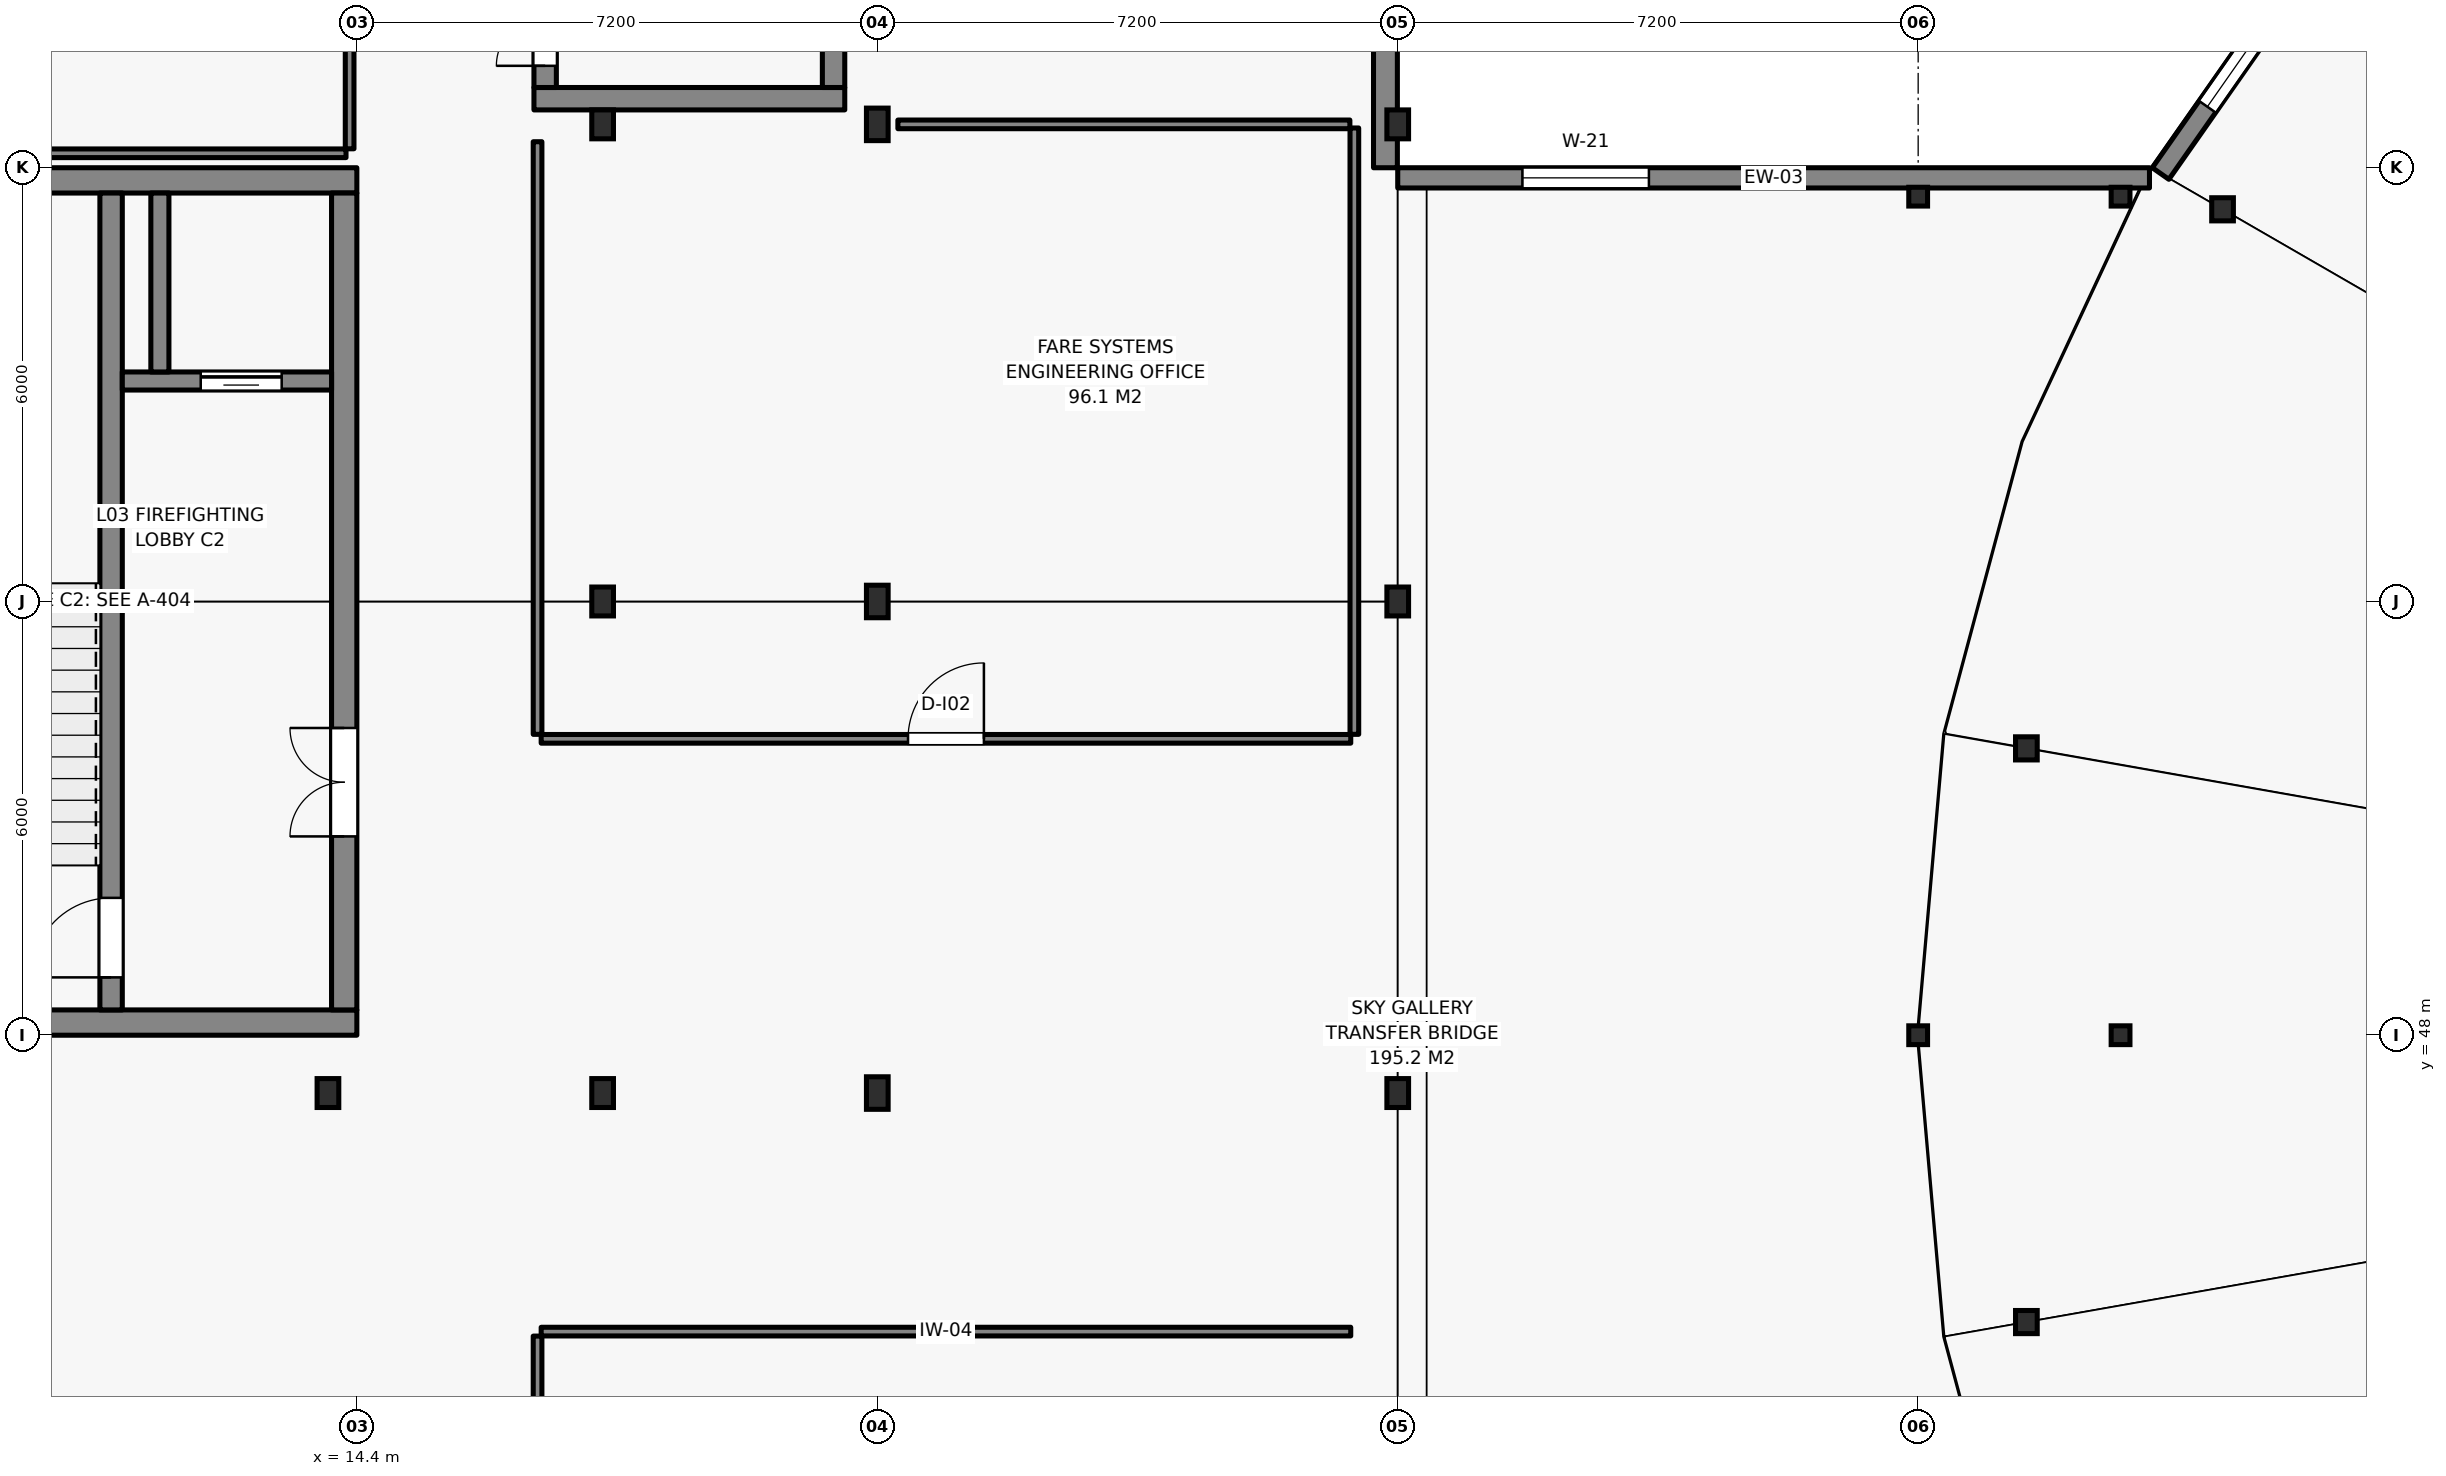
"""IFC4 building model, lengths in metres.
Left out: names, types, materials, properties, quantities, classifications, styles, units other than length and angle.
Written with IfcOpenShell. Run it as: python <this file> out.ifc"""

import sys

from ifc_helpers import new_model, si_unit, direction, frame, frame_2d, origin, origin_2d, place, context, subcontext, project, spatial, rectangle, i_section, extrude, element, fill, save


model = new_model("IFC4")
c1 = context("Model", 3, precision=1e-05, world=origin(), true_north=direction((0.0, 1.0)))
c2 = subcontext(c1, "Body", "Model", "MODEL_VIEW")
j1 = project(units=[si_unit("LENGTHUNIT", "METRE"), si_unit("PLANEANGLEUNIT", "RADIAN")], contexts=[c1])
p1 = place(None, origin())
s1 = spatial("IfcSite", under=j1, at=p1, CompositionType="ELEMENT")
p2 = place(p1, origin())
s2 = spatial("IfcBuilding", under=s1, at=p2, CompositionType="ELEMENT")
p3 = place(p2, frame((0.0, 0.0, 10.5)))
s3 = spatial("IfcBuildingStorey", under=s2, at=p3, CompositionType="ELEMENT", Elevation=10.5)
for number, where, z_axis, x_axis in (
    (1, (7.2, 48.175, 0.0), (0.0, 0.0, 1.0), (1.0, 0.0, 0.0)),
    (2, (7.2, 59.825, 0.0), (0.0, 0.0, 1.0), (1.0, 0.0, 0.0)),
):
    element("IfcWall", number, at=place(p3, frame(where, z_axis=z_axis, x_axis=x_axis)), inside=s3, PredefinedType="SHEAR", context=c2, shape_type="SweptSolid", body=[
        extrude(rectangle(XDim=7.2, YDim=0.35, at=frame_2d((3.6, 0.0))), origin(), (0.0, 0.0, 1.0), 3.95),
    ])
p4 = place(p3, frame((14.225, 48.35, 0.0), z_axis=(0.0, 0.0, 1.0), x_axis=(0.0, 1.0, 0.0)))
e3 = element("IfcWall", 3, at=p4, inside=s3, PredefinedType="SHEAR", context=c2, shape_type="SweptSolid", body=[
    extrude(rectangle(XDim=11.3, YDim=0.35, at=frame_2d((5.65, 0.0))), origin(), (0.0, 0.0, 1.0), 3.95),
])
p5 = place(p4, frame((2.4, 0.0, 0.0)))
e4 = element("IfcOpeningElement", 4, at=p5, cuts=e3, PredefinedType="OPENING", context=c2, shape_type="SweptSolid", body=[
    extrude(rectangle(XDim=1.5, YDim=2.15, at=frame_2d((0.75, 1.075))), frame((0.0, 0.185, 0.0), z_axis=(0.0, -1.0, 0.0), x_axis=(1.0, 0.0, 0.0)), (0.0, 0.0, 1.0), 0.37),
])
p6 = place(p3, frame((11.0, 48.35, 0.0), z_axis=(0.0, 0.0, 1.0), x_axis=(0.0, 1.0, 0.0)))
e5 = element("IfcWall", 5, at=p6, inside=s3, PredefinedType="SHEAR", context=c2, shape_type="SweptSolid", body=[
    extrude(rectangle(XDim=11.3, YDim=0.31, at=frame_2d((5.65, 0.0))), origin(), (0.0, 0.0, 1.0), 3.95),
])
p7 = place(p6, frame((0.45, 0.0, 0.0)))
e6 = element("IfcOpeningElement", 6, at=p7, cuts=e5, PredefinedType="OPENING", context=c2, shape_type="SweptSolid", body=[
    extrude(rectangle(XDim=1.1, YDim=2.15, at=frame_2d((0.55, 1.075))), frame((0.0, 0.165, 0.0), z_axis=(0.0, -1.0, 0.0), x_axis=(1.0, 0.0, 0.0)), (0.0, 0.0, 1.0), 0.33),
])
p8 = place(p3, frame((16.85, 60.955, 0.0), z_axis=(0.0, 0.0, 1.0), x_axis=(1.0, 0.0, 0.0)))
e7 = element("IfcWall", 7, at=p8, inside=s3, PredefinedType="SHEAR", context=c2, shape_type="SweptSolid", body=[
    extrude(rectangle(XDim=4.3, YDim=0.31, at=frame_2d((2.15, 0.0))), origin(), (0.0, 0.0, 1.0), 3.95),
])
p9 = place(p3, frame((17.005, 61.11, 0.0), z_axis=(0.0, 0.0, 1.0), x_axis=(0.0, 1.0, 0.0)))
e8 = element("IfcWall", 8, at=p9, inside=s3, PredefinedType="SHEAR", context=c2, shape_type="SweptSolid", body=[
    extrude(rectangle(XDim=9.58, YDim=0.31, at=frame_2d((4.79, 0.0))), origin(), (0.0, 0.0, 1.0), 3.95),
])
p10 = place(p9, frame((0.3, 0.0, 0.0)))
e9 = element("IfcOpeningElement", 9, at=p10, cuts=e8, PredefinedType="OPENING", context=c2, shape_type="SweptSolid", body=[
    extrude(rectangle(XDim=1.35, YDim=2.15, at=frame_2d((0.675, 1.075))), frame((0.0, 0.165, 0.0), z_axis=(0.0, -1.0, 0.0), x_axis=(1.0, 0.0, 0.0)), (0.0, 0.0, 1.0), 0.33),
])
p11 = place(p3, frame((20.995, 61.11, 0.0), z_axis=(0.0, 0.0, 1.0), x_axis=(0.0, 1.0, 0.0)))
e10 = element("IfcWall", 10, at=p11, inside=s3, PredefinedType="SHEAR", context=c2, shape_type="SweptSolid", body=[
    extrude(rectangle(XDim=9.58, YDim=0.31, at=frame_2d((4.79, 0.0))), origin(), (0.0, 0.0, 1.0), 3.95),
])
for number, where, z_axis, x_axis in (
    (11, (14.0, 47.2, 0.0), (0.0, 0.0, 1.0), (1.0, 0.0, 0.0)),
    (12, (17.8, 47.2, 0.0), (0.0, 0.0, 1.0), (1.0, 0.0, 0.0)),
    (13, (17.8, 54.0, 0.0), (0.0, 0.0, 1.0), (1.0, 0.0, 0.0)),
    (14, (17.8, 60.6, 0.0), (0.0, 0.0, 1.0), (1.0, 0.0, 0.0)),
):
    element("IfcColumn", number, at=place(p3, frame(where, z_axis=z_axis, x_axis=x_axis)), inside=s3, PredefinedType="COLUMN", context=c2, shape_type="SweptSolid", body=[
        extrude(i_section(OverallWidth=0.3, OverallDepth=0.4, WebThickness=0.013, FlangeThickness=0.024, FilletRadius=0.027, at=origin_2d()), origin(), (0.0, 0.0, 1.0), 4.2),
    ])
for number, where, z_axis, x_axis in (
    (15, (21.6, 47.2, 0.0), (0.0, 0.0, 1.0), (1.0, 0.0, 0.0)),
    (16, (21.6, 54.0, 0.0), (0.0, 0.0, 1.0), (1.0, 0.0, 0.0)),
    (17, (21.6, 60.6, 0.0), (0.0, 0.0, 1.0), (1.0, 0.0, 0.0)),
):
    element("IfcColumn", number, at=place(p3, frame(where, z_axis=z_axis, x_axis=x_axis)), inside=s3, PredefinedType="COLUMN", context=c2, shape_type="SweptSolid", body=[
        extrude(i_section(OverallWidth=0.3, OverallDepth=0.45, WebThickness=0.014, FlangeThickness=0.026, FilletRadius=0.027, at=origin_2d()), origin(), (0.0, 0.0, 1.0), 4.2),
    ])
for number, where, z_axis, x_axis in (
    (18, (28.8, 47.2, 0.0), (0.0, 0.0, 1.0), (1.0, 0.0, 0.0)),
    (19, (28.8, 54.0, 0.0), (0.0, 0.0, 1.0), (1.0, 0.0, 0.0)),
    (20, (28.8, 60.6, 0.0), (0.0, 0.0, 1.0), (1.0, 0.0, 0.0)),
):
    element("IfcColumn", number, at=place(p3, frame(where, z_axis=z_axis, x_axis=x_axis)), inside=s3, PredefinedType="COLUMN", context=c2, shape_type="SweptSolid", body=[
        extrude(i_section(OverallWidth=0.3, OverallDepth=0.4, WebThickness=0.013, FlangeThickness=0.024, FilletRadius=0.027, at=origin_2d()), origin(), (0.0, 0.0, 1.0), 4.2),
    ])
for number, where, z_axis, x_axis in (
    (21, (36.0, 48.0, 0.0), (0.0, 0.0, 1.0), (1.0, 0.0, 0.0)),
    (22, (36.0, 59.6, 0.0), (0.0, 0.0, 1.0), (1.0, 0.0, 0.0)),
    (23, (38.8, 48.0, 0.0), (0.0, 0.0, 1.0), (1.0, 0.0, 0.0)),
    (24, (38.8, 59.6, 0.0), (0.0, 0.0, 1.0), (1.0, 0.0, 0.0)),
):
    element("IfcColumn", number, at=place(p3, frame(where, z_axis=z_axis, x_axis=x_axis)), inside=s3, PredefinedType="COLUMN", context=c2, shape_type="SweptSolid", body=[
        extrude(i_section(OverallWidth=0.26, OverallDepth=0.26, WebThickness=0.01, FlangeThickness=0.018, FilletRadius=0.024, at=origin_2d()), origin(), (0.0, 0.0, 1.0), 3.6),
    ])
for number, where, z_axis, x_axis in (
    (25, (40.211, 59.425, 0.0), (0.0, 0.0, 1.0), (1.0, 0.0, 0.0)),
    (26, (37.497, 51.968, 0.0), (0.0, 0.0, 1.0), (1.0, 0.0, 0.0)),
    (27, (37.497, 44.032, 0.0), (0.0, 0.0, 1.0), (1.0, 0.0, 0.0)),
):
    element("IfcColumn", number, at=place(p3, frame(where, z_axis=z_axis, x_axis=x_axis)), inside=s3, PredefinedType="COLUMN", context=c2, shape_type="SweptSolid", body=[
        extrude(i_section(OverallWidth=0.3, OverallDepth=0.32, WebThickness=0.011, FlangeThickness=0.021, FilletRadius=0.027, at=origin_2d()), origin(), (0.0, 0.0, 1.0), 3.95),
    ])
p12 = place(p3, frame((28.63, 60.0, 0.0), z_axis=(0.0, 0.0, 1.0), x_axis=(0.0, 1.0, 0.0)))
e28 = element("IfcWall", 28, at=p12, inside=s3, PredefinedType="SOLIDWALL", context=c2, shape_type="SweptSolid", body=[
    extrude(rectangle(XDim=23.66, YDim=0.33, at=frame_2d((11.83, 0.0))), origin(), (0.0, 0.0, 1.0), 3.235),
])
p13 = place(p3, frame((39.2, 59.86, 0.0), z_axis=(0.0, 0.0, 1.0), x_axis=(-1.0, 0.0, 0.0)))
e29 = element("IfcWall", 29, at=p13, inside=s3, PredefinedType="SOLIDWALL", context=c2, shape_type="SweptSolid", body=[
    extrude(rectangle(XDim=10.4, YDim=0.28, at=frame_2d((5.2, 0.0))), origin(), (0.0, 0.0, 1.0), 3.235),
])
p14 = place(p13, frame((6.925, 0.0, 0.845)))
e30 = element("IfcOpeningElement", 30, at=p14, cuts=e29, PredefinedType="OPENING", context=c2, shape_type="SweptSolid", body=[
    extrude(rectangle(XDim=1.75, YDim=2.15, at=frame_2d((0.875, 1.075))), frame((0.0, 0.15, 0.0), z_axis=(0.0, -1.0, 0.0), x_axis=(1.0, 0.0, 0.0)), (0.0, 0.0, 1.0), 0.3),
])
p15 = place(p3, frame((41.738, 63.324, 0.0), z_axis=(0.0, 0.0, 1.0), x_axis=(-0.573549082007, -0.819171197327, 0.0)))
e31 = element("IfcWall", 31, at=p15, inside=s3, PredefinedType="SOLIDWALL", context=c2, shape_type="SweptSolid", body=[
    extrude(rectangle(XDim=4.156, YDim=0.28, at=frame_2d((2.078, 0.0))), origin(), (0.0, 0.0, 1.0), 3.95),
])
p16 = place(p15, frame((1.128, 0.0, 0.85)))
e32 = element("IfcOpeningElement", 32, at=p16, cuts=e31, PredefinedType="OPENING", context=c2, shape_type="SweptSolid", body=[
    extrude(rectangle(XDim=1.9, YDim=2.3, at=frame_2d((0.95, 1.15))), frame((0.0, 0.15, 0.0), z_axis=(0.0, -1.0, 0.0), x_axis=(1.0, 0.0, 0.0)), (0.0, 0.0, 1.0), 0.3),
])
p17 = place(p3, frame((11.155, 57.05, 0.0), z_axis=(0.0, 0.0, 1.0), x_axis=(1.0, 0.0, 0.0)))
e33 = element("IfcWall", 33, at=p17, inside=s3, PredefinedType="SHEAR", context=c2, shape_type="SweptSolid", body=[
    extrude(rectangle(XDim=2.895, YDim=0.25, at=frame_2d((1.448, 0.0))), origin(), (0.0, 0.0, 1.0), 3.95),
])
p18 = place(p17, frame((1.085, 0.0, 0.0)))
e34 = element("IfcOpeningElement", 34, at=p18, cuts=e33, PredefinedType="OPENING", context=c2, shape_type="SweptSolid", body=[
    extrude(rectangle(XDim=1.12, YDim=2.15, at=frame_2d((0.56, 1.075))), frame((0.0, 0.135, 0.0), z_axis=(0.0, -1.0, 0.0), x_axis=(1.0, 0.0, 0.0)), (0.0, 0.0, 1.0), 0.27),
])
p19 = place(p3, frame((11.675, 57.175, 0.0), z_axis=(0.0, 0.0, 1.0), x_axis=(0.0, 1.0, 0.0)))
e35 = element("IfcWall", 35, at=p19, inside=s3, PredefinedType="SHEAR", context=c2, shape_type="SweptSolid", body=[
    extrude(rectangle(XDim=2.475, YDim=0.25, at=frame_2d((1.237, 0.0))), origin(), (0.0, 0.0, 1.0), 3.95),
])
p20 = place(p3, frame((28.15, 43.9, 0.0), z_axis=(0.0, 0.0, 1.0), x_axis=(-1.0, 0.0, 0.0)))
e36 = element("IfcWall", 36, at=p20, inside=s3, PredefinedType="PARTITIONING", context=c2, shape_type="SweptSolid", body=[
    extrude(rectangle(XDim=11.2, YDim=0.12, at=frame_2d((5.6, 0.0))), origin(), (0.0, 0.0, 1.0), 3.58),
])
p21 = place(p3, frame((16.9, 43.838, 0.0), z_axis=(0.0, 0.0, 1.0), x_axis=(0.0, -1.0, 0.0)))
e37 = element("IfcWall", 37, at=p21, inside=s3, PredefinedType="PARTITIONING", context=c2, shape_type="SweptSolid", body=[
    extrude(rectangle(XDim=23.126, YDim=0.12, at=frame_2d((11.563, 0.0))), origin(), (0.0, 0.0, 1.0), 3.58),
])
p22 = place(p3, frame((5.035, 60.2, 0.0), z_axis=(0.0, 0.0, 1.0), x_axis=(1.0, 0.0, 0.0)))
e38 = element("IfcWall", 38, at=p22, inside=s3, PredefinedType="PARTITIONING", context=c2, shape_type="SweptSolid", body=[
    extrude(rectangle(XDim=9.215, YDim=0.12, at=frame_2d((4.607, 0.0))), origin(), (0.0, 0.0, 1.0), 3.58),
])
p23 = place(p3, frame((14.3, 60.262, 0.0), z_axis=(0.0, 0.0, 1.0), x_axis=(0.0, 1.0, 0.0)))
e39 = element("IfcWall", 39, at=p23, inside=s3, PredefinedType="PARTITIONING", context=c2, shape_type="SweptSolid", body=[
    extrude(rectangle(XDim=13.298, YDim=0.12, at=frame_2d((6.649, 0.0))), origin(), (0.0, 0.0, 1.0), 3.525),
])
p24 = place(p23, frame((6.159, 0.0, 0.0)))
e40 = element("IfcOpeningElement", 40, at=p24, cuts=e39, PredefinedType="OPENING", context=c2, shape_type="SweptSolid", body=[
    extrude(rectangle(XDim=0.98, YDim=2.15, at=frame_2d((0.49, 1.075))), frame((0.0, 0.07, 0.0), z_axis=(0.0, -1.0, 0.0), x_axis=(1.0, 0.0, 0.0)), (0.0, 0.0, 1.0), 0.14),
])
p25 = place(p3, frame((16.95, 52.1, 0.0), z_axis=(0.0, 0.0, 1.0), x_axis=(1.0, 0.0, 0.0)))
e41 = element("IfcWall", 41, at=p25, inside=s3, PredefinedType="PARTITIONING", context=c2, shape_type="SweptSolid", body=[
    extrude(rectangle(XDim=11.2, YDim=0.12, at=frame_2d((5.6, 0.0))), origin(), (0.0, 0.0, 1.0), 3.565),
])
p26 = place(p25, frame((5.075, 0.0, 0.0)))
e42 = element("IfcOpeningElement", 42, at=p26, cuts=e41, PredefinedType="OPENING", context=c2, shape_type="SweptSolid", body=[
    extrude(rectangle(XDim=1.05, YDim=2.15, at=frame_2d((0.525, 1.075))), frame((0.0, 0.07, 0.0), z_axis=(0.0, -1.0, 0.0), x_axis=(1.0, 0.0, 0.0)), (0.0, 0.0, 1.0), 0.14),
])
p27 = place(p3, frame((28.2, 52.162, 0.0), z_axis=(0.0, 0.0, 1.0), x_axis=(0.0, 1.0, 0.0)))
e43 = element("IfcWall", 43, at=p27, inside=s3, PredefinedType="PARTITIONING", context=c2, shape_type="SweptSolid", body=[
    extrude(rectangle(XDim=8.388, YDim=0.12, at=frame_2d((4.194, 0.0))), origin(), (0.0, 0.0, 1.0), 3.525),
])
p28 = place(p3, frame((28.138, 60.6, 0.0), z_axis=(0.0, 0.0, 1.0), x_axis=(-1.0, 0.0, 0.0)))
e44 = element("IfcWall", 44, at=p28, inside=s3, PredefinedType="PARTITIONING", context=c2, shape_type="SweptSolid", body=[
    extrude(rectangle(XDim=6.253, YDim=0.12, at=frame_2d((3.126, 0.0))), origin(), (0.0, 0.0, 1.0), 3.525),
])
p29 = place(p3, frame((16.9, 60.36, 0.0), z_axis=(0.0, 0.0, 1.0), x_axis=(0.0, -1.0, 0.0)))
e45 = element("IfcWall", 45, at=p29, inside=s3, PredefinedType="PARTITIONING", context=c2, shape_type="SweptSolid", body=[
    extrude(rectangle(XDim=8.198, YDim=0.12, at=frame_2d((4.099, 0.0))), origin(), (0.0, 0.0, 1.0), 3.58),
])
p30 = place(p14, origin())
e46 = element("IfcWindow", 46, at=p30, inside=s3, PartitioningType="SINGLE_PANEL", PredefinedType="WINDOW", context=c2, shape_type="SweptSolid", body=[
    extrude(rectangle(XDim=1.75, YDim=2.15, at=frame_2d((0.875, 1.075))), frame((0.0, 0.03, 0.0), z_axis=(0.0, -1.0, 0.0), x_axis=(1.0, 0.0, 0.0)), (0.0, 0.0, 1.0), 0.06),
])
fill(e30, e46)
p31 = place(p16, origin())
e47 = element("IfcWindow", 47, at=p31, inside=s3, PartitioningType="SINGLE_PANEL", PredefinedType="WINDOW", context=c2, shape_type="SweptSolid", body=[
    extrude(rectangle(XDim=1.9, YDim=2.3, at=frame_2d((0.95, 1.15))), frame((0.0, 0.03, 0.0), z_axis=(0.0, -1.0, 0.0), x_axis=(1.0, 0.0, 0.0)), (0.0, 0.0, 1.0), 0.06),
])
fill(e32, e47)
p32 = place(p18, origin())
e48 = element("IfcDoor", 48, at=p32, inside=s3, OperationType="SLIDING_TO_LEFT", PredefinedType="DOOR", context=c2, shape_type="SweptSolid", body=[
    extrude(rectangle(XDim=1.12, YDim=2.15, at=frame_2d((0.56, 1.075))), frame((0.0, 0.025, 0.0), z_axis=(0.0, -1.0, 0.0), x_axis=(1.0, 0.0, 0.0)), (0.0, 0.0, 1.0), 0.05),
])
fill(e34, e48)
p33 = place(p5, origin())
e49 = element("IfcDoor", 49, at=p33, inside=s3, OperationType="DOUBLE_DOOR_SINGLE_SWING", PredefinedType="DOOR", context=c2, shape_type="SweptSolid", body=[
    extrude(rectangle(XDim=1.5, YDim=2.15, at=frame_2d((0.75, 1.075))), frame((0.0, 0.025, 0.0), z_axis=(0.0, -1.0, 0.0), x_axis=(1.0, 0.0, 0.0)), (0.0, 0.0, 1.0), 0.05),
])
fill(e4, e49)
p34 = place(p7, origin())
e50 = element("IfcDoor", 50, at=p34, inside=s3, OperationType="SINGLE_SWING_LEFT", PredefinedType="DOOR", context=c2, shape_type="SweptSolid", body=[
    extrude(rectangle(XDim=1.1, YDim=2.15, at=frame_2d((0.55, 1.075))), frame((0.0, 0.025, 0.0), z_axis=(0.0, -1.0, 0.0), x_axis=(1.0, 0.0, 0.0)), (0.0, 0.0, 1.0), 0.05),
])
fill(e6, e50)
p35 = place(p10, origin())
e51 = element("IfcDoor", 51, at=p35, inside=s3, OperationType="DOUBLE_DOOR_SINGLE_SWING", PredefinedType="DOOR", context=c2, shape_type="SweptSolid", body=[
    extrude(rectangle(XDim=1.35, YDim=2.15, at=frame_2d((0.675, 1.075))), frame((0.0, 0.025, 0.0), z_axis=(0.0, -1.0, 0.0), x_axis=(1.0, 0.0, 0.0)), (0.0, 0.0, 1.0), 0.05),
])
fill(e9, e51)
p36 = place(p26, origin())
e52 = element("IfcDoor", 52, at=p36, inside=s3, OperationType="SINGLE_SWING_RIGHT", PredefinedType="DOOR", context=c2, shape_type="SweptSolid", body=[
    extrude(rectangle(XDim=1.05, YDim=2.15, at=frame_2d((0.525, 1.075))), frame((0.0, 0.025, 0.0), z_axis=(0.0, -1.0, 0.0), x_axis=(1.0, 0.0, 0.0)), (0.0, 0.0, 1.0), 0.05),
])
fill(e42, e52)
save(model, sys.argv[1])
